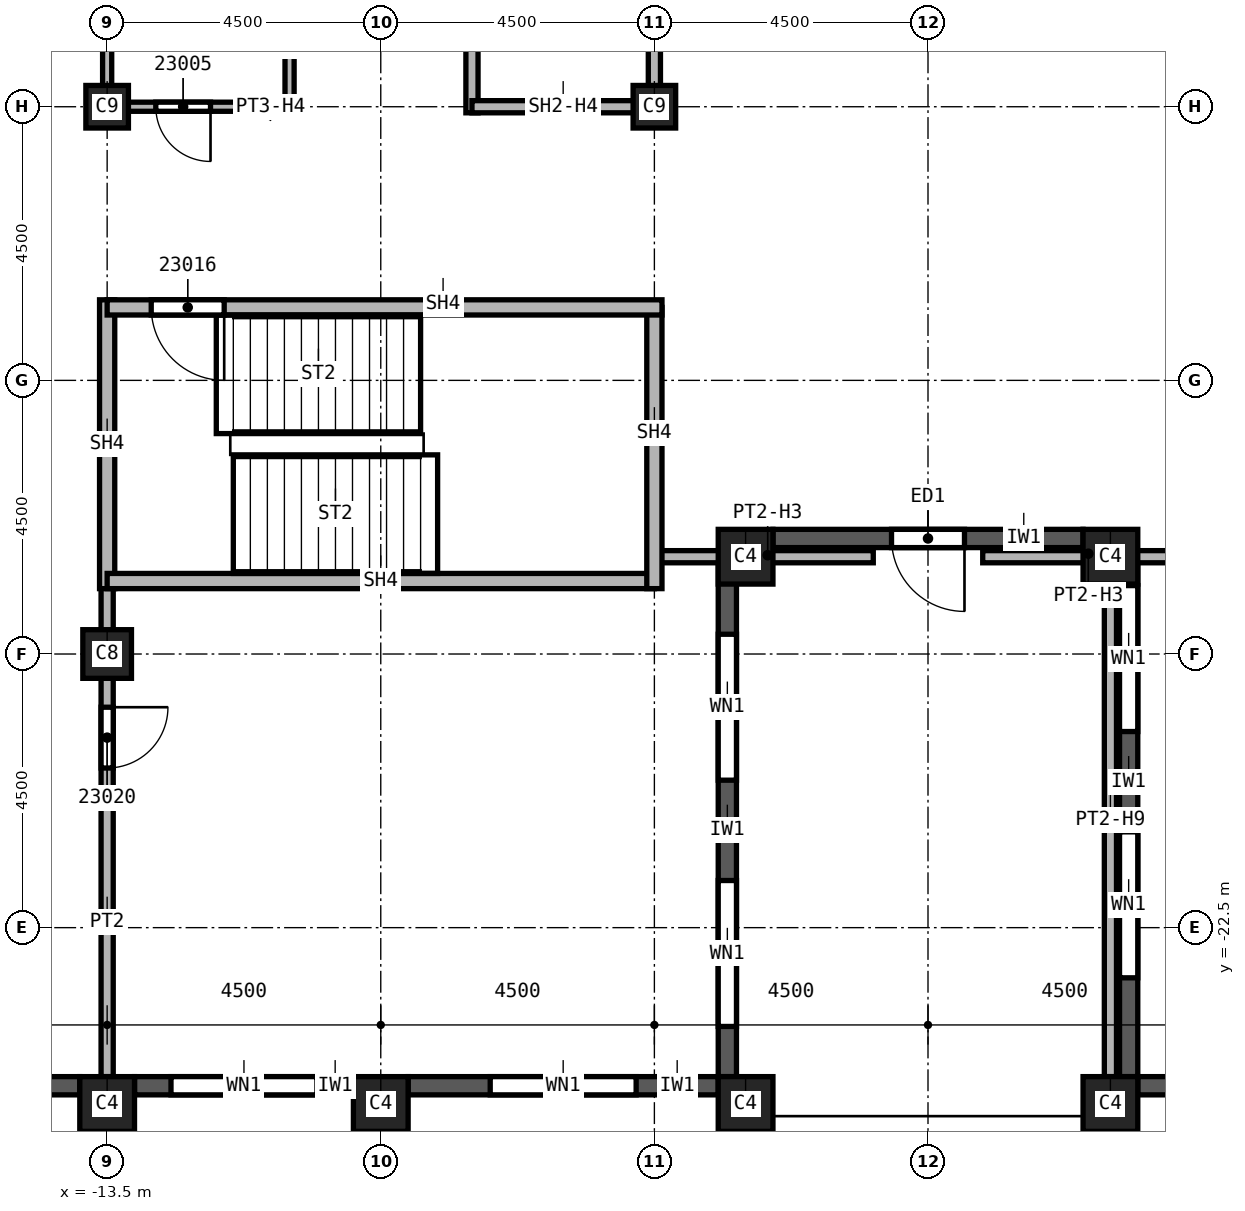
"""IFC4 building model, lengths in metres.
Left out: names, types, materials, properties, quantities, classifications, styles, units other than length and angle.
Written with IfcOpenShell. Run it as: python <this file> out.ifc"""

import sys

from ifc_helpers import new_model, si_unit, direction, frame, frame_2d, origin, origin_2d, place, context, subcontext, project, spatial, rectangle, extrude, element, fill, save


model = new_model("IFC4")
c1 = context("Model", 3, precision=1e-05, world=origin(), true_north=direction((0.0, 1.0)))
c2 = subcontext(c1, "Body", "Model", "MODEL_VIEW")
j1 = project(units=[si_unit("LENGTHUNIT", "METRE"), si_unit("PLANEANGLEUNIT", "RADIAN")], contexts=[c1])
p1 = place(None, origin())
s1 = spatial("IfcSite", under=j1, at=p1, CompositionType="ELEMENT")
p2 = place(p1, origin())
s2 = spatial("IfcBuilding", under=s1, at=p2, CompositionType="ELEMENT")
p3 = place(p2, frame((0.0, 0.0, 326.0)))
s3 = spatial("IfcBuildingStorey", under=s2, at=p3, CompositionType="ELEMENT", Elevation=326.0)
p4 = place(p3, frame((-13.5, -18.0, 0.0), z_axis=(0.0, 0.0, 1.0), x_axis=(1.0, 0.0, 0.0)))
e1 = element("IfcColumn", 1, at=p4, inside=s3, PredefinedType="COLUMN", context=c2, shape_type="SweptSolid", body=[
    extrude(rectangle(XDim=0.8, YDim=0.8, at=origin_2d()), origin(), (0.0, 0.0, 1.0), 3.74),
])
for number, where, z_axis, x_axis in (
    (2, (-4.5, -9.0, 0.0), (0.0, 0.0, 1.0), (1.0, 0.0, 0.0)),
    (3, (-13.5, -9.0, 0.0), (0.0, 0.0, 1.0), (1.0, 0.0, 0.0)),
):
    element("IfcColumn", number, at=place(p3, frame(where, z_axis=z_axis, x_axis=x_axis)), inside=s3, PredefinedType="COLUMN", context=c2, shape_type="SweptSolid", body=[
        extrude(rectangle(XDim=0.7, YDim=0.7, at=origin_2d()), origin(), (0.0, 0.0, 1.0), 3.74),
    ])
for number, where, z_axis, x_axis in (
    (4, (3.0, -25.4, 0.0), (0.0, 0.0, 1.0), (1.0, 0.0, 0.0)),
    (5, (-3.0, -25.4, 0.0), (0.0, 0.0, 1.0), (1.0, 0.0, 0.0)),
    (6, (-9.0, -25.4, 0.0), (0.0, 0.0, 1.0), (1.0, 0.0, 0.0)),
    (7, (-13.5, -25.4, 0.0), (0.0, 0.0, 1.0), (1.0, 0.0, 0.0)),
    (8, (3.0, -16.4, 0.0), (0.0, 0.0, 1.0), (1.0, 0.0, 0.0)),
    (9, (-3.0, -16.4, 0.0), (0.0, 0.0, 1.0), (1.0, 0.0, 0.0)),
):
    element("IfcColumn", number, at=place(p3, frame(where, z_axis=z_axis, x_axis=x_axis)), inside=s3, PredefinedType="COLUMN", context=c2, shape_type="SweptSolid", body=[
        extrude(rectangle(XDim=0.9, YDim=0.9, at=origin_2d()), origin(), (0.0, 0.0, 1.0), 3.74),
    ])
p5 = place(p3, frame((-17.55, -25.1, 0.0), z_axis=(0.0, 0.0, 1.0), x_axis=(1.0, 0.0, 0.0)))
e10 = element("IfcWall", 10, at=p5, inside=s3, PredefinedType="SOLIDWALL", context=c2, shape_type="SweptSolid", body=[
    extrude(rectangle(XDim=3.6, YDim=0.3, at=frame_2d((1.8, 0.0))), origin(), (0.0, 0.0, 1.0), 3.14),
])
p6 = place(p5, frame((0.775, 0.0, 0.8)))
e11 = element("IfcOpeningElement", 11, at=p6, cuts=e10, PredefinedType="OPENING", context=c2, shape_type="SweptSolid", body=[
    extrude(rectangle(XDim=1.0, YDim=1.95, at=frame_2d((0.5, 0.975))), frame((0.0, 0.15, 0.0), z_axis=(0.0, -1.0, 0.0), x_axis=(1.0, 0.0, 0.0)), (0.0, 0.0, 1.0), 0.3),
])
p7 = place(p5, frame((2.375, 0.0, 0.8)))
e12 = element("IfcOpeningElement", 12, at=p7, cuts=e10, PredefinedType="OPENING", context=c2, shape_type="SweptSolid", body=[
    extrude(rectangle(XDim=0.6, YDim=1.95, at=frame_2d((0.3, 0.975))), frame((0.0, 0.15, 0.0), z_axis=(0.0, -1.0, 0.0), x_axis=(1.0, 0.0, 0.0)), (0.0, 0.0, 1.0), 0.3),
])
p8 = place(p3, frame((-13.05, -25.1, 0.0), z_axis=(0.0, 0.0, 1.0), x_axis=(1.0, 0.0, 0.0)))
e13 = element("IfcWall", 13, at=p8, inside=s3, PredefinedType="SOLIDWALL", context=c2, shape_type="SweptSolid", body=[
    extrude(rectangle(XDim=3.6, YDim=0.3, at=frame_2d((1.8, 0.0))), origin(), (0.0, 0.0, 1.0), 3.14),
])
p9 = place(p8, frame((0.6, 0.0, 0.8)))
e14 = element("IfcOpeningElement", 14, at=p9, cuts=e13, PredefinedType="OPENING", context=c2, shape_type="SweptSolid", body=[
    extrude(rectangle(XDim=2.4, YDim=1.95, at=frame_2d((1.2, 0.975))), frame((0.0, 0.15, 0.0), z_axis=(0.0, -1.0, 0.0), x_axis=(1.0, 0.0, 0.0)), (0.0, 0.0, 1.0), 0.3),
])
p10 = place(p3, frame((-8.55, -25.1, 0.0), z_axis=(0.0, 0.0, 1.0), x_axis=(1.0, 0.0, 0.0)))
e15 = element("IfcWall", 15, at=p10, inside=s3, PredefinedType="SOLIDWALL", context=c2, shape_type="SweptSolid", body=[
    extrude(rectangle(XDim=5.1, YDim=0.3, at=frame_2d((2.55, 0.0))), origin(), (0.0, 0.0, 1.0), 3.14),
])
p11 = place(p10, frame((1.35, 0.0, 0.8)))
e16 = element("IfcOpeningElement", 16, at=p11, cuts=e15, PredefinedType="OPENING", context=c2, shape_type="SweptSolid", body=[
    extrude(rectangle(XDim=2.4, YDim=1.95, at=frame_2d((1.2, 0.975))), frame((0.0, 0.15, 0.0), z_axis=(0.0, -1.0, 0.0), x_axis=(1.0, 0.0, 0.0)), (0.0, 0.0, 1.0), 0.3),
])
p12 = place(p3, frame((-3.3, -24.95, 0.0), z_axis=(0.0, 0.0, 1.0), x_axis=(0.0, 1.0, 0.0)))
e17 = element("IfcWall", 17, at=p12, inside=s3, PredefinedType="SOLIDWALL", context=c2, shape_type="SweptSolid", body=[
    extrude(rectangle(XDim=8.5, YDim=0.3, at=frame_2d((4.25, 0.0))), origin(), (0.0, 0.0, 1.0), 3.14),
])
p13 = place(p12, frame((0.825, 0.0, 0.8)))
e18 = element("IfcOpeningElement", 18, at=p13, cuts=e17, PredefinedType="OPENING", context=c2, shape_type="SweptSolid", body=[
    extrude(rectangle(XDim=2.4, YDim=1.95, at=frame_2d((1.2, 0.975))), frame((0.0, 0.15, 0.0), z_axis=(0.0, -1.0, 0.0), x_axis=(1.0, 0.0, 0.0)), (0.0, 0.0, 1.0), 0.3),
])
p14 = place(p12, frame((4.875, 0.0, 0.8)))
e19 = element("IfcOpeningElement", 19, at=p14, cuts=e17, PredefinedType="OPENING", context=c2, shape_type="SweptSolid", body=[
    extrude(rectangle(XDim=2.4, YDim=1.95, at=frame_2d((1.2, 0.975))), frame((0.0, 0.15, 0.0), z_axis=(0.0, -1.0, 0.0), x_axis=(1.0, 0.0, 0.0)), (0.0, 0.0, 1.0), 0.3),
])
p15 = place(p3, frame((2.55, -16.1, 0.0), z_axis=(0.0, 0.0, 1.0), x_axis=(-1.0, 0.0, 0.0)))
e20 = element("IfcWall", 20, at=p15, inside=s3, PredefinedType="SOLIDWALL", context=c2, shape_type="SweptSolid", body=[
    extrude(rectangle(XDim=5.1, YDim=0.3, at=frame_2d((2.55, 0.0))), origin(), (0.0, 0.0, 1.0), 3.14),
])
p16 = place(p15, frame((1.95, 0.0, 0.0)))
e21 = element("IfcOpeningElement", 21, at=p16, cuts=e20, PredefinedType="OPENING", context=c2, shape_type="SweptSolid", body=[
    extrude(rectangle(XDim=1.2, YDim=2.4, at=frame_2d((0.6, 1.2))), frame((0.0, 0.15, 0.0), z_axis=(0.0, -1.0, 0.0), x_axis=(1.0, 0.0, 0.0)), (0.0, 0.0, 1.0), 0.3),
])
p17 = place(p3, frame((3.3, -16.45, 0.0), z_axis=(0.0, 0.0, 1.0), x_axis=(0.0, -1.0, 0.0)))
e22 = element("IfcWall", 22, at=p17, inside=s3, PredefinedType="SOLIDWALL", context=c2, shape_type="SweptSolid", body=[
    extrude(rectangle(XDim=8.5, YDim=0.3, at=frame_2d((4.25, 0.0))), origin(), (0.0, 0.0, 1.0), 3.14),
])
p18 = place(p17, frame((0.425, 0.0, 0.8)))
e23 = element("IfcOpeningElement", 23, at=p18, cuts=e22, PredefinedType="OPENING", context=c2, shape_type="SweptSolid", body=[
    extrude(rectangle(XDim=2.4, YDim=1.95, at=frame_2d((1.2, 0.975))), frame((0.0, 0.15, 0.0), z_axis=(0.0, -1.0, 0.0), x_axis=(1.0, 0.0, 0.0)), (0.0, 0.0, 1.0), 0.3),
])
p19 = place(p17, frame((4.475, 0.0, 0.8)))
e24 = element("IfcOpeningElement", 24, at=p19, cuts=e22, PredefinedType="OPENING", context=c2, shape_type="SweptSolid", body=[
    extrude(rectangle(XDim=2.4, YDim=1.95, at=frame_2d((1.2, 0.975))), frame((0.0, 0.15, 0.0), z_axis=(0.0, -1.0, 0.0), x_axis=(1.0, 0.0, 0.0)), (0.0, 0.0, 1.0), 0.3),
])
p20 = place(p3, frame((3.45, -25.1, 0.0), z_axis=(0.0, 0.0, 1.0), x_axis=(1.0, 0.0, 0.0)))
e25 = element("IfcWall", 25, at=p20, inside=s3, PredefinedType="SOLIDWALL", context=c2, shape_type="SweptSolid", body=[
    extrude(rectangle(XDim=5.1, YDim=0.3, at=frame_2d((2.55, 0.0))), origin(), (0.0, 0.0, 1.0), 3.14),
])
p21 = place(p20, frame((1.35, 0.0, 0.8)))
e26 = element("IfcOpeningElement", 26, at=p21, cuts=e25, PredefinedType="OPENING", context=c2, shape_type="SweptSolid", body=[
    extrude(rectangle(XDim=2.4, YDim=1.95, at=frame_2d((1.2, 0.975))), frame((0.0, 0.15, 0.0), z_axis=(0.0, -1.0, 0.0), x_axis=(1.0, 0.0, 0.0)), (0.0, 0.0, 1.0), 0.3),
])
p22 = place(p3, frame((-13.5, -16.675, 0.0), z_axis=(0.0, 0.0, 1.0), x_axis=(0.0, -1.0, 0.0)))
e27 = element("IfcWall", 27, at=p22, inside=s3, PredefinedType="PARTITIONING", context=c2, shape_type="SweptSolid", body=[
    extrude(rectangle(XDim=8.275, YDim=0.2, at=frame_2d((4.137, 0.0))), origin(), (0.0, 0.0, 1.0), 3.74),
])
p23 = place(p22, frame((2.2, 0.0, 0.0)))
e28 = element("IfcOpeningElement", 28, at=p23, cuts=e27, PredefinedType="OPENING", context=c2, shape_type="SweptSolid", body=[
    extrude(rectangle(XDim=1.0, YDim=2.1, at=frame_2d((0.5, 1.05))), frame((0.0, 0.1, 0.0), z_axis=(0.0, -1.0, 0.0), x_axis=(1.0, 0.0, 0.0)), (0.0, 0.0, 1.0), 0.2),
])
p24 = place(p3, frame((-0.9, -16.4, 0.0), z_axis=(0.0, 0.0, 1.0), x_axis=(-1.0, 0.0, 0.0)))
e29 = element("IfcWall", 29, at=p24, inside=s3, PredefinedType="PARTITIONING", context=c2, shape_type="SweptSolid", body=[
    extrude(rectangle(XDim=3.6, YDim=0.2, at=frame_2d((1.8, 0.0))), origin(), (0.0, 0.0, 1.0), 3.204),
])
p25 = place(p3, frame((3.0, -16.4, 0.0), z_axis=(0.0, 0.0, 1.0), x_axis=(0.0, -1.0, 0.0)))
e30 = element("IfcWall", 30, at=p25, inside=s3, PredefinedType="PARTITIONING", context=c2, shape_type="SweptSolid", body=[
    extrude(rectangle(XDim=8.55, YDim=0.2, at=frame_2d((4.275, 0.0))), origin(), (0.0, 0.0, 1.0), 2.894),
])
p26 = place(p3, frame((4.5, -16.4, 0.0), z_axis=(0.0, 0.0, 1.0), x_axis=(-1.0, 0.0, 0.0)))
e31 = element("IfcWall", 31, at=p26, inside=s3, PredefinedType="PARTITIONING", context=c2, shape_type="SweptSolid", body=[
    extrude(rectangle(XDim=3.6, YDim=0.2, at=frame_2d((1.8, 0.0))), origin(), (0.0, 0.0, 1.0), 3.204),
])
p27 = place(p3, frame((-7.5, -9.1, 0.0), z_axis=(0.0, 0.0, 1.0), x_axis=(0.0, 1.0, 0.0)))
e32 = element("IfcWall", 32, at=p27, inside=s3, PredefinedType="SOLIDWALL", context=c2, shape_type="SweptSolid", body=[
    extrude(rectangle(XDim=6.225, YDim=0.2, at=frame_2d((3.113, 0.0))), origin(), (0.0, 0.0, 1.0), 3.74),
])
p28 = place(p3, frame((-4.5, -9.0, 0.0), z_axis=(0.0, 0.0, 1.0), x_axis=(-1.0, 0.0, 0.0)))
e33 = element("IfcWall", 33, at=p28, inside=s3, PredefinedType="SOLIDWALL", context=c2, shape_type="SweptSolid", body=[
    extrude(rectangle(XDim=3.0, YDim=0.2, at=frame_2d((1.5, 0.0))), origin(), (0.0, 0.0, 1.0), 3.062),
])
p29 = place(p3, frame((-4.5, 6.0, 0.0), z_axis=(0.0, 0.0, 1.0), x_axis=(0.0, -1.0, 0.0)))
e34 = element("IfcWall", 34, at=p29, inside=s3, PredefinedType="SOLIDWALL", context=c2, shape_type="SweptSolid", body=[
    extrude(rectangle(XDim=15.1, YDim=0.2, at=frame_2d((7.55, 0.0))), origin(), (0.0, 0.0, 1.0), 3.062),
])
p30 = place(p29, frame((12.25, 0.0, 0.0)))
e35 = element("IfcOpeningElement", 35, at=p30, cuts=e34, PredefinedType="OPENING", context=c2, shape_type="SweptSolid", body=[
    extrude(rectangle(XDim=1.1, YDim=2.1, at=frame_2d((0.55, 1.05))), frame((0.0, 0.1, 0.0), z_axis=(0.0, -1.0, 0.0), x_axis=(1.0, 0.0, 0.0)), (0.0, 0.0, 1.0), 0.2),
])
p31 = place(p29, frame((8.2, 0.0, 0.0)))
e36 = element("IfcOpeningElement", 36, at=p31, cuts=e34, PredefinedType="OPENING", context=c2, shape_type="SweptSolid", body=[
    extrude(rectangle(XDim=1.1, YDim=2.1, at=frame_2d((0.55, 1.05))), frame((0.0, 0.1, 0.0), z_axis=(0.0, -1.0, 0.0), x_axis=(1.0, 0.0, 0.0)), (0.0, 0.0, 1.0), 0.2),
])
p32 = place(p3, frame((-13.5, -12.175, 0.0), z_axis=(0.0, 0.0, 1.0), x_axis=(0.0, -1.0, 0.0)))
e37 = element("IfcWall", 37, at=p32, inside=s3, PredefinedType="SOLIDWALL", context=c2, shape_type="SweptSolid", body=[
    extrude(rectangle(XDim=4.75, YDim=0.25, at=frame_2d((2.375, 0.0))), origin(), (0.0, 0.0, 1.0), 3.74),
])
p33 = place(p3, frame((-4.5, -16.8, 0.0), z_axis=(0.0, 0.0, 1.0), x_axis=(-1.0, 0.0, 0.0)))
e38 = element("IfcWall", 38, at=p33, inside=s3, PredefinedType="SOLIDWALL", context=c2, shape_type="SweptSolid", body=[
    extrude(rectangle(XDim=9.0, YDim=0.25, at=frame_2d((4.5, 0.0))), origin(), (0.0, 0.0, 1.0), 3.74),
])
p34 = place(p3, frame((-4.5, -12.3, 0.0), z_axis=(0.0, 0.0, 1.0), x_axis=(0.0, -1.0, 0.0)))
e39 = element("IfcWall", 39, at=p34, inside=s3, PredefinedType="SOLIDWALL", context=c2, shape_type="SweptSolid", body=[
    extrude(rectangle(XDim=4.625, YDim=0.25, at=frame_2d((2.312, 0.0))), origin(), (0.0, 0.0, 1.0), 3.74),
])
p35 = place(p3, frame((-4.375, -12.3, 0.0), z_axis=(0.0, 0.0, 1.0), x_axis=(-1.0, 0.0, 0.0)))
e40 = element("IfcWall", 40, at=p35, inside=s3, PredefinedType="SOLIDWALL", context=c2, shape_type="SweptSolid", body=[
    extrude(rectangle(XDim=9.125, YDim=0.25, at=frame_2d((4.562, 0.0))), origin(), (0.0, 0.0, 1.0), 3.74),
])
p36 = place(p35, frame((7.2, 0.0, 0.0)))
e41 = element("IfcOpeningElement", 41, at=p36, cuts=e40, PredefinedType="OPENING", context=c2, shape_type="SweptSolid", body=[
    extrude(rectangle(XDim=1.2, YDim=2.1, at=frame_2d((0.6, 1.05))), frame((0.0, 0.125, 0.0), z_axis=(0.0, -1.0, 0.0), x_axis=(1.0, 0.0, 0.0)), (0.0, 0.0, 1.0), 0.25),
])
p37 = place(p3, frame((-13.5, -9.075, 0.0), z_axis=(0.0, 0.0, 1.0), x_axis=(0.0, 1.0, 0.0)))
e42 = element("IfcWall", 42, at=p37, inside=s3, PredefinedType="PARTITIONING", context=c2, shape_type="SweptSolid", body=[
    extrude(rectangle(XDim=2.075, YDim=0.15, at=frame_2d((1.038, 0.0))), origin(), (0.0, 0.0, 1.0), 3.062),
])
p38 = place(p3, frame((-10.5, -9.075, 0.0), z_axis=(0.0, 0.0, 1.0), x_axis=(0.0, 1.0, 0.0)))
e43 = element("IfcWall", 43, at=p38, inside=s3, PredefinedType="PARTITIONING", context=c2, shape_type="SweptSolid", body=[
    extrude(rectangle(XDim=2.15, YDim=0.15, at=frame_2d((1.075, 0.0))), origin(), (0.0, 0.0, 1.0), 3.74),
])
p39 = place(p3, frame((-10.5, -9.0, 0.0), z_axis=(0.0, 0.0, 1.0), x_axis=(-1.0, 0.0, 0.0)))
e44 = element("IfcWall", 44, at=p39, inside=s3, PredefinedType="PARTITIONING", context=c2, shape_type="SweptSolid", body=[
    extrude(rectangle(XDim=3.0, YDim=0.15, at=frame_2d((1.5, 0.0))), origin(), (0.0, 0.0, 1.0), 3.062),
])
p40 = place(p39, frame((1.3, 0.0, 0.0)))
e45 = element("IfcOpeningElement", 45, at=p40, cuts=e44, PredefinedType="OPENING", context=c2, shape_type="SweptSolid", body=[
    extrude(rectangle(XDim=0.9, YDim=2.1, at=frame_2d((0.45, 1.05))), frame((0.0, 0.075, 0.0), z_axis=(0.0, -1.0, 0.0), x_axis=(1.0, 0.0, 0.0)), (0.0, 0.0, 1.0), 0.15),
])
p41 = place(p9, origin())
e46 = element("IfcWindow", 46, at=p41, inside=s3, PartitioningType="SINGLE_PANEL", PredefinedType="WINDOW", context=c2, shape_type="SweptSolid", body=[
    extrude(rectangle(XDim=2.4, YDim=1.95, at=frame_2d((1.2, 0.975))), frame((0.0, 0.03, 0.0), z_axis=(0.0, -1.0, 0.0), x_axis=(1.0, 0.0, 0.0)), (0.0, 0.0, 1.0), 0.06),
])
fill(e14, e46)
p42 = place(p11, origin())
e47 = element("IfcWindow", 47, at=p42, inside=s3, PartitioningType="SINGLE_PANEL", PredefinedType="WINDOW", context=c2, shape_type="SweptSolid", body=[
    extrude(rectangle(XDim=2.4, YDim=1.95, at=frame_2d((1.2, 0.975))), frame((0.0, 0.03, 0.0), z_axis=(0.0, -1.0, 0.0), x_axis=(1.0, 0.0, 0.0)), (0.0, 0.0, 1.0), 0.06),
])
fill(e16, e47)
p43 = place(p13, origin())
e48 = element("IfcWindow", 48, at=p43, inside=s3, PartitioningType="SINGLE_PANEL", PredefinedType="WINDOW", context=c2, shape_type="SweptSolid", body=[
    extrude(rectangle(XDim=2.4, YDim=1.95, at=frame_2d((1.2, 0.975))), frame((0.0, 0.03, 0.0), z_axis=(0.0, -1.0, 0.0), x_axis=(1.0, 0.0, 0.0)), (0.0, 0.0, 1.0), 0.06),
])
fill(e18, e48)
p44 = place(p14, origin())
e49 = element("IfcWindow", 49, at=p44, inside=s3, PartitioningType="SINGLE_PANEL", PredefinedType="WINDOW", context=c2, shape_type="SweptSolid", body=[
    extrude(rectangle(XDim=2.4, YDim=1.95, at=frame_2d((1.2, 0.975))), frame((0.0, 0.03, 0.0), z_axis=(0.0, -1.0, 0.0), x_axis=(1.0, 0.0, 0.0)), (0.0, 0.0, 1.0), 0.06),
])
fill(e19, e49)
p45 = place(p16, origin())
e50 = element("IfcDoor", 50, at=p45, inside=s3, OperationType="SINGLE_SWING_LEFT", PredefinedType="DOOR", context=c2, shape_type="SweptSolid", body=[
    extrude(rectangle(XDim=1.2, YDim=2.4, at=frame_2d((0.6, 1.2))), frame((0.0, 0.025, 0.0), z_axis=(0.0, -1.0, 0.0), x_axis=(1.0, 0.0, 0.0)), (0.0, 0.0, 1.0), 0.05),
])
fill(e21, e50)
p46 = place(p18, origin())
e51 = element("IfcWindow", 51, at=p46, inside=s3, PartitioningType="SINGLE_PANEL", PredefinedType="WINDOW", context=c2, shape_type="SweptSolid", body=[
    extrude(rectangle(XDim=2.4, YDim=1.95, at=frame_2d((1.2, 0.975))), frame((0.0, 0.03, 0.0), z_axis=(0.0, -1.0, 0.0), x_axis=(1.0, 0.0, 0.0)), (0.0, 0.0, 1.0), 0.06),
])
fill(e23, e51)
p47 = place(p19, origin())
e52 = element("IfcWindow", 52, at=p47, inside=s3, PartitioningType="SINGLE_PANEL", PredefinedType="WINDOW", context=c2, shape_type="SweptSolid", body=[
    extrude(rectangle(XDim=2.4, YDim=1.95, at=frame_2d((1.2, 0.975))), frame((0.0, 0.03, 0.0), z_axis=(0.0, -1.0, 0.0), x_axis=(1.0, 0.0, 0.0)), (0.0, 0.0, 1.0), 0.06),
])
fill(e24, e52)
p48 = place(p40, origin())
e53 = element("IfcDoor", 53, at=p48, inside=s3, OperationType="SINGLE_SWING_RIGHT", PredefinedType="DOOR", context=c2, shape_type="SweptSolid", body=[
    extrude(rectangle(XDim=0.9, YDim=2.1, at=frame_2d((0.45, 1.05))), frame((0.0, 0.025, 0.0), z_axis=(0.0, -1.0, 0.0), x_axis=(1.0, 0.0, 0.0)), (0.0, 0.0, 1.0), 0.05),
])
fill(e45, e53)
p49 = place(p36, origin())
e54 = element("IfcDoor", 54, at=p49, inside=s3, OperationType="SINGLE_SWING_LEFT", PredefinedType="DOOR", context=c2, shape_type="SweptSolid", body=[
    extrude(rectangle(XDim=1.2, YDim=2.1, at=frame_2d((0.6, 1.05))), frame((0.0, 0.025, 0.0), z_axis=(0.0, -1.0, 0.0), x_axis=(1.0, 0.0, 0.0)), (0.0, 0.0, 1.0), 0.05),
])
fill(e41, e54)
p50 = place(p23, origin())
e55 = element("IfcDoor", 55, at=p50, inside=s3, OperationType="SINGLE_SWING_LEFT", PredefinedType="DOOR", context=c2, shape_type="SweptSolid", body=[
    extrude(rectangle(XDim=1.0, YDim=2.1, at=frame_2d((0.5, 1.05))), frame((0.0, 0.025, 0.0), z_axis=(0.0, -1.0, 0.0), x_axis=(1.0, 0.0, 0.0)), (0.0, 0.0, 1.0), 0.05),
])
fill(e28, e55)
save(model, sys.argv[1])
